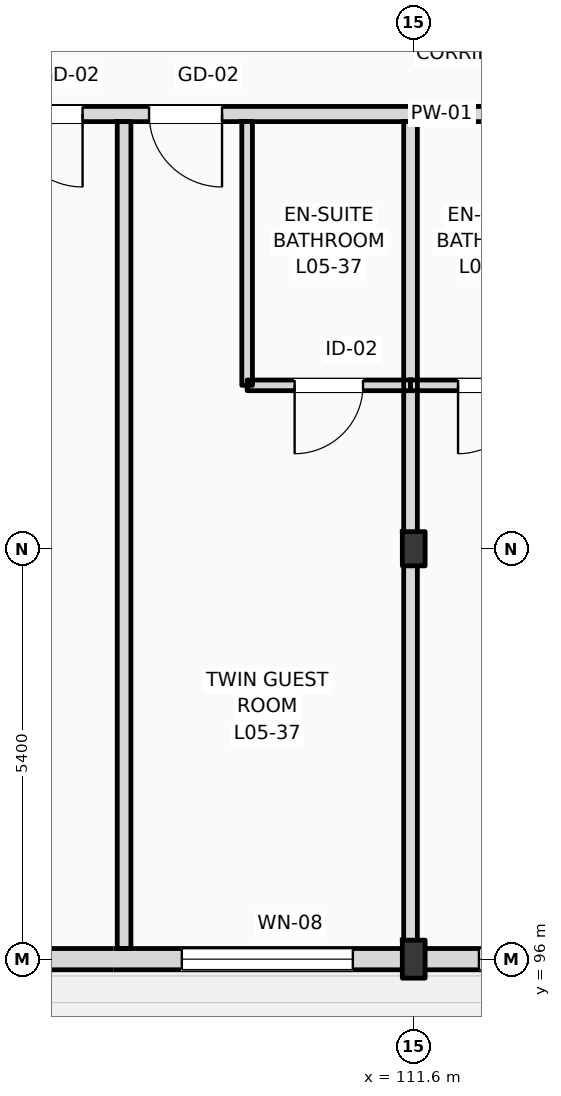
"""IFC4 building model, lengths in metres.
Left out: names, types, materials, properties, quantities, classifications, styles, units other than length and angle.
Written with IfcOpenShell. Run it as: python <this file> out.ifc"""

import sys

from ifc_helpers import new_model, si_unit, direction, frame, frame_2d, origin, origin_2d, place, context, subcontext, project, spatial, rectangle, i_section, extrude, element, fill, save


model = new_model("IFC4")
c1 = context("Model", 3, precision=1e-05, world=origin(), true_north=direction((0.0, 1.0)))
c2 = subcontext(c1, "Body", "Model", "MODEL_VIEW")
j1 = project(units=[si_unit("LENGTHUNIT", "METRE"), si_unit("PLANEANGLEUNIT", "RADIAN")], contexts=[c1])
p1 = place(None, origin())
s1 = spatial("IfcSite", under=j1, at=p1, CompositionType="ELEMENT")
p2 = place(p1, origin())
s2 = spatial("IfcBuilding", under=s1, at=p2, CompositionType="ELEMENT")
p3 = place(p2, frame((0.0, 0.0, 24.6)))
s3 = spatial("IfcBuildingStorey", under=s2, at=p3, CompositionType="ELEMENT", Elevation=24.6)
p4 = place(p3, frame((111.6, 96.0, 0.0), z_axis=(0.0, 0.0, 1.0), x_axis=(1.0, 0.0, 0.0)))
e1 = element("IfcColumn", 1, at=p4, inside=s3, PredefinedType="COLUMN", context=c2, shape_type="SweptSolid", body=[
    extrude(i_section(OverallWidth=0.3, OverallDepth=0.5, WebThickness=0.014, FlangeThickness=0.028, FilletRadius=0.027, at=origin_2d()), origin(), (0.0, 0.0, 1.0), 3.6),
])
p5 = place(p3, frame((111.6, 101.4, 0.0), z_axis=(0.0, 0.0, 1.0), x_axis=(1.0, 0.0, 0.0)))
e2 = element("IfcColumn", 2, at=p5, inside=s3, PredefinedType="COLUMN", context=c2, shape_type="SweptSolid", body=[
    extrude(i_section(OverallWidth=0.3, OverallDepth=0.45, WebThickness=0.014, FlangeThickness=0.026, FilletRadius=0.027, at=origin_2d()), origin(), (0.0, 0.0, 1.0), 3.6),
])
p6 = place(p3, frame((25.2, 96.0, 0.0), z_axis=(0.0, 0.0, 1.0), x_axis=(1.0, 0.0, 0.0)))
e3 = element("IfcWall", 3, at=p6, inside=s3, PredefinedType="STANDARD", context=c2, shape_type="SweptSolid", body=[
    extrude(rectangle(XDim=94.8, YDim=0.28, at=frame_2d((47.4, 0.0))), origin(), (0.0, 0.0, 1.0), 2.78),
])
p7 = place(p6, frame((16.539, 0.0, 0.9)))
e4 = element("IfcOpeningElement", 4, at=p7, cuts=e3, PredefinedType="OPENING", context=c2, shape_type="SweptSolid", body=[
    extrude(rectangle(XDim=1.75, YDim=1.7, at=frame_2d((0.875, 0.85))), frame((0.0, 0.15, 0.0), z_axis=(0.0, -1.0, 0.0), x_axis=(1.0, 0.0, 0.0)), (0.0, 0.0, 1.0), 0.3),
])
p8 = place(p6, frame((20.367, 0.0, 0.9)))
e5 = element("IfcOpeningElement", 5, at=p8, cuts=e3, PredefinedType="OPENING", context=c2, shape_type="SweptSolid", body=[
    extrude(rectangle(XDim=2.0, YDim=1.7, at=frame_2d((1.0, 0.85))), frame((0.0, 0.15, 0.0), z_axis=(0.0, -1.0, 0.0), x_axis=(1.0, 0.0, 0.0)), (0.0, 0.0, 1.0), 0.3),
])
p9 = place(p6, frame((24.326, 0.0, 0.9)))
e6 = element("IfcOpeningElement", 6, at=p9, cuts=e3, PredefinedType="OPENING", context=c2, shape_type="SweptSolid", body=[
    extrude(rectangle(XDim=2.3, YDim=1.7, at=frame_2d((1.15, 0.85))), frame((0.0, 0.15, 0.0), z_axis=(0.0, -1.0, 0.0), x_axis=(1.0, 0.0, 0.0)), (0.0, 0.0, 1.0), 0.3),
])
p10 = place(p6, frame((27.684, 0.0, 0.9)))
e7 = element("IfcOpeningElement", 7, at=p10, cuts=e3, PredefinedType="OPENING", context=c2, shape_type="SweptSolid", body=[
    extrude(rectangle(XDim=2.6, YDim=1.7, at=frame_2d((1.3, 0.85))), frame((0.0, 0.15, 0.0), z_axis=(0.0, -1.0, 0.0), x_axis=(1.0, 0.0, 0.0)), (0.0, 0.0, 1.0), 0.3),
])
p11 = place(p6, frame((32.083, 0.0, 0.9)))
e8 = element("IfcOpeningElement", 8, at=p11, cuts=e3, PredefinedType="OPENING", context=c2, shape_type="SweptSolid", body=[
    extrude(rectangle(XDim=2.419, YDim=1.7, at=frame_2d((1.209, 0.85))), frame((0.0, 0.15, 0.0), z_axis=(0.0, -1.0, 0.0), x_axis=(1.0, 0.0, 0.0)), (0.0, 0.0, 1.0), 0.3),
])
p12 = place(p6, frame((35.322, 0.0, 0.9)))
e9 = element("IfcOpeningElement", 9, at=p12, cuts=e3, PredefinedType="OPENING", context=c2, shape_type="SweptSolid", body=[
    extrude(rectangle(XDim=2.868, YDim=1.7, at=frame_2d((1.434, 0.85))), frame((0.0, 0.15, 0.0), z_axis=(0.0, -1.0, 0.0), x_axis=(1.0, 0.0, 0.0)), (0.0, 0.0, 1.0), 0.3),
])
p13 = place(p6, frame((56.015, 0.0, 0.9)))
e10 = element("IfcOpeningElement", 10, at=p13, cuts=e3, PredefinedType="OPENING", context=c2, shape_type="SweptSolid", body=[
    extrude(rectangle(XDim=1.2, YDim=1.7, at=frame_2d((0.6, 0.85))), frame((0.0, 0.15, 0.0), z_axis=(0.0, -1.0, 0.0), x_axis=(1.0, 0.0, 0.0)), (0.0, 0.0, 1.0), 0.3),
])
p14 = place(p6, frame((59.888, 0.0, 0.9)))
e11 = element("IfcOpeningElement", 11, at=p14, cuts=e3, PredefinedType="OPENING", context=c2, shape_type="SweptSolid", body=[
    extrude(rectangle(XDim=1.35, YDim=1.7, at=frame_2d((0.675, 0.85))), frame((0.0, 0.15, 0.0), z_axis=(0.0, -1.0, 0.0), x_axis=(1.0, 0.0, 0.0)), (0.0, 0.0, 1.0), 0.3),
])
p15 = place(p6, frame((63.799, 0.0, 0.9)))
e12 = element("IfcOpeningElement", 12, at=p15, cuts=e3, PredefinedType="OPENING", context=c2, shape_type="SweptSolid", body=[
    extrude(rectangle(XDim=1.5, YDim=1.7, at=frame_2d((0.75, 0.85))), frame((0.0, 0.15, 0.0), z_axis=(0.0, -1.0, 0.0), x_axis=(1.0, 0.0, 0.0)), (0.0, 0.0, 1.0), 0.3),
])
p16 = place(p6, frame((67.709, 0.0, 0.9)))
e13 = element("IfcOpeningElement", 13, at=p16, cuts=e3, PredefinedType="OPENING", context=c2, shape_type="SweptSolid", body=[
    extrude(rectangle(XDim=1.65, YDim=1.7, at=frame_2d((0.825, 0.85))), frame((0.0, 0.15, 0.0), z_axis=(0.0, -1.0, 0.0), x_axis=(1.0, 0.0, 0.0)), (0.0, 0.0, 1.0), 0.3),
])
p17 = place(p6, frame((71.618, 0.0, 0.9)))
e14 = element("IfcOpeningElement", 14, at=p17, cuts=e3, PredefinedType="OPENING", context=c2, shape_type="SweptSolid", body=[
    extrude(rectangle(XDim=1.8, YDim=1.7, at=frame_2d((0.9, 0.85))), frame((0.0, 0.15, 0.0), z_axis=(0.0, -1.0, 0.0), x_axis=(1.0, 0.0, 0.0)), (0.0, 0.0, 1.0), 0.3),
])
p18 = place(p6, frame((75.129, 0.0, 0.9)))
e15 = element("IfcOpeningElement", 15, at=p18, cuts=e3, PredefinedType="OPENING", context=c2, shape_type="SweptSolid", body=[
    extrude(rectangle(XDim=1.95, YDim=1.7, at=frame_2d((0.975, 0.85))), frame((0.0, 0.15, 0.0), z_axis=(0.0, -1.0, 0.0), x_axis=(1.0, 0.0, 0.0)), (0.0, 0.0, 1.0), 0.3),
])
p19 = place(p6, frame((79.439, 0.0, 0.9)))
e16 = element("IfcOpeningElement", 16, at=p19, cuts=e3, PredefinedType="OPENING", context=c2, shape_type="SweptSolid", body=[
    extrude(rectangle(XDim=2.1, YDim=1.7, at=frame_2d((1.05, 0.85))), frame((0.0, 0.15, 0.0), z_axis=(0.0, -1.0, 0.0), x_axis=(1.0, 0.0, 0.0)), (0.0, 0.0, 1.0), 0.3),
])
p20 = place(p6, frame((83.349, 0.0, 0.9)))
e17 = element("IfcOpeningElement", 17, at=p20, cuts=e3, PredefinedType="OPENING", context=c2, shape_type="SweptSolid", body=[
    extrude(rectangle(XDim=2.25, YDim=1.7, at=frame_2d((1.125, 0.85))), frame((0.0, 0.15, 0.0), z_axis=(0.0, -1.0, 0.0), x_axis=(1.0, 0.0, 0.0)), (0.0, 0.0, 1.0), 0.3),
])
p21 = place(p6, frame((87.258, 0.0, 0.9)))
e18 = element("IfcOpeningElement", 18, at=p21, cuts=e3, PredefinedType="OPENING", context=c2, shape_type="SweptSolid", body=[
    extrude(rectangle(XDim=2.4, YDim=1.7, at=frame_2d((1.2, 0.85))), frame((0.0, 0.15, 0.0), z_axis=(0.0, -1.0, 0.0), x_axis=(1.0, 0.0, 0.0)), (0.0, 0.0, 1.0), 0.3),
])
p22 = place(p6, frame((91.204, 0.0, 0.9)))
e19 = element("IfcOpeningElement", 19, at=p22, cuts=e3, PredefinedType="OPENING", context=c2, shape_type="SweptSolid", body=[
    extrude(rectangle(XDim=2.55, YDim=1.7, at=frame_2d((1.275, 0.85))), frame((0.0, 0.15, 0.0), z_axis=(0.0, -1.0, 0.0), x_axis=(1.0, 0.0, 0.0)), (0.0, 0.0, 1.0), 0.3),
])
p23 = place(p3, frame((79.76, 107.12, 0.0), z_axis=(0.0, 0.0, 1.0), x_axis=(1.0, 0.0, 0.0)))
e20 = element("IfcWall", 20, at=p23, inside=s3, PredefinedType="PARTITIONING", context=c2, shape_type="SweptSolid", body=[
    extrude(rectangle(XDim=40.1, YDim=0.2, at=frame_2d((20.05, 0.0))), origin(), (0.0, 0.0, 1.0), 3.34),
])
p24 = place(p23, frame((2.65, 0.0, 0.0)))
e21 = element("IfcOpeningElement", 21, at=p24, cuts=e20, PredefinedType="OPENING", context=c2, shape_type="SweptSolid", body=[
    extrude(rectangle(XDim=0.96, YDim=2.2, at=frame_2d((0.48, 1.1))), frame((0.0, 0.11, 0.0), z_axis=(0.0, -1.0, 0.0), x_axis=(1.0, 0.0, 0.0)), (0.0, 0.0, 1.0), 0.22),
])
p25 = place(p23, frame((4.448, 0.0, 0.0)))
e22 = element("IfcOpeningElement", 22, at=p25, cuts=e20, PredefinedType="OPENING", context=c2, shape_type="SweptSolid", body=[
    extrude(rectangle(XDim=0.96, YDim=2.2, at=frame_2d((0.48, 1.1))), frame((0.0, 0.11, 0.0), z_axis=(0.0, -1.0, 0.0), x_axis=(1.0, 0.0, 0.0)), (0.0, 0.0, 1.0), 0.22),
])
p26 = place(p23, frame((10.583, 0.0, 0.0)))
e23 = element("IfcOpeningElement", 23, at=p26, cuts=e20, PredefinedType="OPENING", context=c2, shape_type="SweptSolid", body=[
    extrude(rectangle(XDim=0.96, YDim=2.2, at=frame_2d((0.48, 1.1))), frame((0.0, 0.11, 0.0), z_axis=(0.0, -1.0, 0.0), x_axis=(1.0, 0.0, 0.0)), (0.0, 0.0, 1.0), 0.22),
])
p27 = place(p23, frame((12.418, 0.0, 0.0)))
e24 = element("IfcOpeningElement", 24, at=p27, cuts=e20, PredefinedType="OPENING", context=c2, shape_type="SweptSolid", body=[
    extrude(rectangle(XDim=0.96, YDim=2.2, at=frame_2d((0.48, 1.1))), frame((0.0, 0.11, 0.0), z_axis=(0.0, -1.0, 0.0), x_axis=(1.0, 0.0, 0.0)), (0.0, 0.0, 1.0), 0.22),
])
p28 = place(p23, frame((18.553, 0.0, 0.0)))
e25 = element("IfcOpeningElement", 25, at=p28, cuts=e20, PredefinedType="OPENING", context=c2, shape_type="SweptSolid", body=[
    extrude(rectangle(XDim=0.96, YDim=2.2, at=frame_2d((0.48, 1.1))), frame((0.0, 0.11, 0.0), z_axis=(0.0, -1.0, 0.0), x_axis=(1.0, 0.0, 0.0)), (0.0, 0.0, 1.0), 0.22),
])
p29 = place(p23, frame((20.388, 0.0, 0.0)))
e26 = element("IfcOpeningElement", 26, at=p29, cuts=e20, PredefinedType="OPENING", context=c2, shape_type="SweptSolid", body=[
    extrude(rectangle(XDim=0.96, YDim=2.2, at=frame_2d((0.48, 1.1))), frame((0.0, 0.11, 0.0), z_axis=(0.0, -1.0, 0.0), x_axis=(1.0, 0.0, 0.0)), (0.0, 0.0, 1.0), 0.22),
])
p30 = place(p23, frame((26.523, 0.0, 0.0)))
e27 = element("IfcOpeningElement", 27, at=p30, cuts=e20, PredefinedType="OPENING", context=c2, shape_type="SweptSolid", body=[
    extrude(rectangle(XDim=0.96, YDim=2.2, at=frame_2d((0.48, 1.1))), frame((0.0, 0.11, 0.0), z_axis=(0.0, -1.0, 0.0), x_axis=(1.0, 0.0, 0.0)), (0.0, 0.0, 1.0), 0.22),
])
p31 = place(p23, frame((28.358, 0.0, 0.0)))
e28 = element("IfcOpeningElement", 28, at=p31, cuts=e20, PredefinedType="OPENING", context=c2, shape_type="SweptSolid", body=[
    extrude(rectangle(XDim=0.96, YDim=2.2, at=frame_2d((0.48, 1.1))), frame((0.0, 0.11, 0.0), z_axis=(0.0, -1.0, 0.0), x_axis=(1.0, 0.0, 0.0)), (0.0, 0.0, 1.0), 0.22),
])
p32 = place(p23, frame((34.493, 0.0, 0.0)))
e29 = element("IfcOpeningElement", 29, at=p32, cuts=e20, PredefinedType="OPENING", context=c2, shape_type="SweptSolid", body=[
    extrude(rectangle(XDim=0.96, YDim=2.2, at=frame_2d((0.48, 1.1))), frame((0.0, 0.11, 0.0), z_axis=(0.0, -1.0, 0.0), x_axis=(1.0, 0.0, 0.0)), (0.0, 0.0, 1.0), 0.22),
])
p33 = place(p23, frame((36.364, 0.0, 0.0)))
e30 = element("IfcOpeningElement", 30, at=p33, cuts=e20, PredefinedType="OPENING", context=c2, shape_type="SweptSolid", body=[
    extrude(rectangle(XDim=0.96, YDim=2.2, at=frame_2d((0.48, 1.1))), frame((0.0, 0.11, 0.0), z_axis=(0.0, -1.0, 0.0), x_axis=(1.0, 0.0, 0.0)), (0.0, 0.0, 1.0), 0.22),
])
p34 = place(p3, frame((107.789, 96.14, 0.0), z_axis=(0.0, 0.0, 1.0), x_axis=(0.0, 1.0, 0.0)))
e31 = element("IfcWall", 31, at=p34, inside=s3, PredefinedType="PARTITIONING", context=c2, shape_type="SweptSolid", body=[
    extrude(rectangle(XDim=10.88, YDim=0.18, at=frame_2d((5.44, 0.0))), origin(), (0.0, 0.0, 1.0), 3.34),
])
p35 = place(p3, frame((111.558, 96.14, 0.0), z_axis=(0.0, 0.0, 1.0), x_axis=(0.0, 1.0, 0.0)))
e32 = element("IfcWall", 32, at=p35, inside=s3, PredefinedType="PARTITIONING", context=c2, shape_type="SweptSolid", body=[
    extrude(rectangle(XDim=10.88, YDim=0.18, at=frame_2d((5.44, 0.0))), origin(), (0.0, 0.0, 1.0), 2.93),
])
p36 = place(p3, frame((109.408, 103.55, 0.0), z_axis=(0.0, 0.0, 1.0), x_axis=(0.0, 1.0, 0.0)))
e33 = element("IfcWall", 33, at=p36, inside=s3, PredefinedType="PARTITIONING", context=c2, shape_type="SweptSolid", body=[
    extrude(rectangle(XDim=3.47, YDim=0.14, at=frame_2d((1.735, 0.0))), origin(), (0.0, 0.0, 1.0), 3.34),
])
p37 = place(p3, frame((109.408, 103.55, 0.0), z_axis=(0.0, 0.0, 1.0), x_axis=(1.0, 0.0, 0.0)))
e34 = element("IfcWall", 34, at=p37, inside=s3, PredefinedType="PARTITIONING", context=c2, shape_type="SweptSolid", body=[
    extrude(rectangle(XDim=2.15, YDim=0.14, at=frame_2d((1.075, 0.0))), origin(), (0.0, 0.0, 1.0), 3.34),
])
p38 = place(p37, frame((0.625, 0.0, 0.0)))
e35 = element("IfcOpeningElement", 35, at=p38, cuts=e34, PredefinedType="OPENING", context=c2, shape_type="SweptSolid", body=[
    extrude(rectangle(XDim=0.9, YDim=2.1, at=frame_2d((0.45, 1.05))), frame((0.0, 0.08, 0.0), z_axis=(0.0, -1.0, 0.0), x_axis=(1.0, 0.0, 0.0)), (0.0, 0.0, 1.0), 0.16),
])
p39 = place(p3, frame((111.558, 103.55, 0.0), z_axis=(0.0, 0.0, 1.0), x_axis=(1.0, 0.0, 0.0)))
e36 = element("IfcWall", 36, at=p39, inside=s3, PredefinedType="PARTITIONING", context=c2, shape_type="SweptSolid", body=[
    extrude(rectangle(XDim=2.15, YDim=0.14, at=frame_2d((1.075, 0.0))), origin(), (0.0, 0.0, 1.0), 3.34),
])
p40 = place(p39, frame((0.625, 0.0, 0.0)))
e37 = element("IfcOpeningElement", 37, at=p40, cuts=e36, PredefinedType="OPENING", context=c2, shape_type="SweptSolid", body=[
    extrude(rectangle(XDim=0.9, YDim=2.1, at=frame_2d((0.45, 1.05))), frame((0.0, 0.08, 0.0), z_axis=(0.0, -1.0, 0.0), x_axis=(1.0, 0.0, 0.0)), (0.0, 0.0, 1.0), 0.16),
])
p41 = place(p20, origin())
e38 = element("IfcWindow", 38, at=p41, inside=s3, PartitioningType="DOUBLE_PANEL_VERTICAL", PredefinedType="WINDOW", context=c2, shape_type="SweptSolid", body=[
    extrude(rectangle(XDim=2.25, YDim=1.7, at=frame_2d((1.125, 0.85))), frame((0.0, 0.03, 0.0), z_axis=(0.0, -1.0, 0.0), x_axis=(1.0, 0.0, 0.0)), (0.0, 0.0, 1.0), 0.06),
])
fill(e17, e38)
p42 = place(p21, origin())
e39 = element("IfcWindow", 39, at=p42, inside=s3, PartitioningType="DOUBLE_PANEL_VERTICAL", PredefinedType="WINDOW", context=c2, shape_type="SweptSolid", body=[
    extrude(rectangle(XDim=2.4, YDim=1.7, at=frame_2d((1.2, 0.85))), frame((0.0, 0.03, 0.0), z_axis=(0.0, -1.0, 0.0), x_axis=(1.0, 0.0, 0.0)), (0.0, 0.0, 1.0), 0.06),
])
fill(e18, e39)
p43 = place(p30, frame((0.96, 0.0, 0.0), z_axis=(0.0, 0.0, 1.0), x_axis=(-1.0, 0.0, 0.0)))
e40 = element("IfcDoor", 40, at=p43, inside=s3, OperationType="SINGLE_SWING_RIGHT", PredefinedType="DOOR", context=c2, shape_type="SweptSolid", body=[
    extrude(rectangle(XDim=0.96, YDim=2.2, at=frame_2d((0.48, 1.1))), frame((0.0, 0.025, 0.0), z_axis=(0.0, -1.0, 0.0), x_axis=(1.0, 0.0, 0.0)), (0.0, 0.0, 1.0), 0.05),
])
fill(e27, e40)
p44 = place(p31, frame((0.96, 0.0, 0.0), z_axis=(0.0, 0.0, 1.0), x_axis=(-1.0, 0.0, 0.0)))
e41 = element("IfcDoor", 41, at=p44, inside=s3, OperationType="SINGLE_SWING_RIGHT", PredefinedType="DOOR", context=c2, shape_type="SweptSolid", body=[
    extrude(rectangle(XDim=0.96, YDim=2.2, at=frame_2d((0.48, 1.1))), frame((0.0, 0.025, 0.0), z_axis=(0.0, -1.0, 0.0), x_axis=(1.0, 0.0, 0.0)), (0.0, 0.0, 1.0), 0.05),
])
fill(e28, e41)
p45 = place(p38, frame((0.9, 0.0, 0.0), z_axis=(0.0, 0.0, 1.0), x_axis=(-1.0, 0.0, 0.0)))
e42 = element("IfcDoor", 42, at=p45, inside=s3, OperationType="SINGLE_SWING_LEFT", PredefinedType="DOOR", context=c2, shape_type="SweptSolid", body=[
    extrude(rectangle(XDim=0.9, YDim=2.1, at=frame_2d((0.45, 1.05))), frame((0.0, 0.025, 0.0), z_axis=(0.0, -1.0, 0.0), x_axis=(1.0, 0.0, 0.0)), (0.0, 0.0, 1.0), 0.05),
])
fill(e35, e42)
p46 = place(p40, frame((0.9, 0.0, 0.0), z_axis=(0.0, 0.0, 1.0), x_axis=(-1.0, 0.0, 0.0)))
e43 = element("IfcDoor", 43, at=p46, inside=s3, OperationType="SINGLE_SWING_LEFT", PredefinedType="DOOR", context=c2, shape_type="SweptSolid", body=[
    extrude(rectangle(XDim=0.9, YDim=2.1, at=frame_2d((0.45, 1.05))), frame((0.0, 0.025, 0.0), z_axis=(0.0, -1.0, 0.0), x_axis=(1.0, 0.0, 0.0)), (0.0, 0.0, 1.0), 0.05),
])
fill(e37, e43)
save(model, sys.argv[1])
